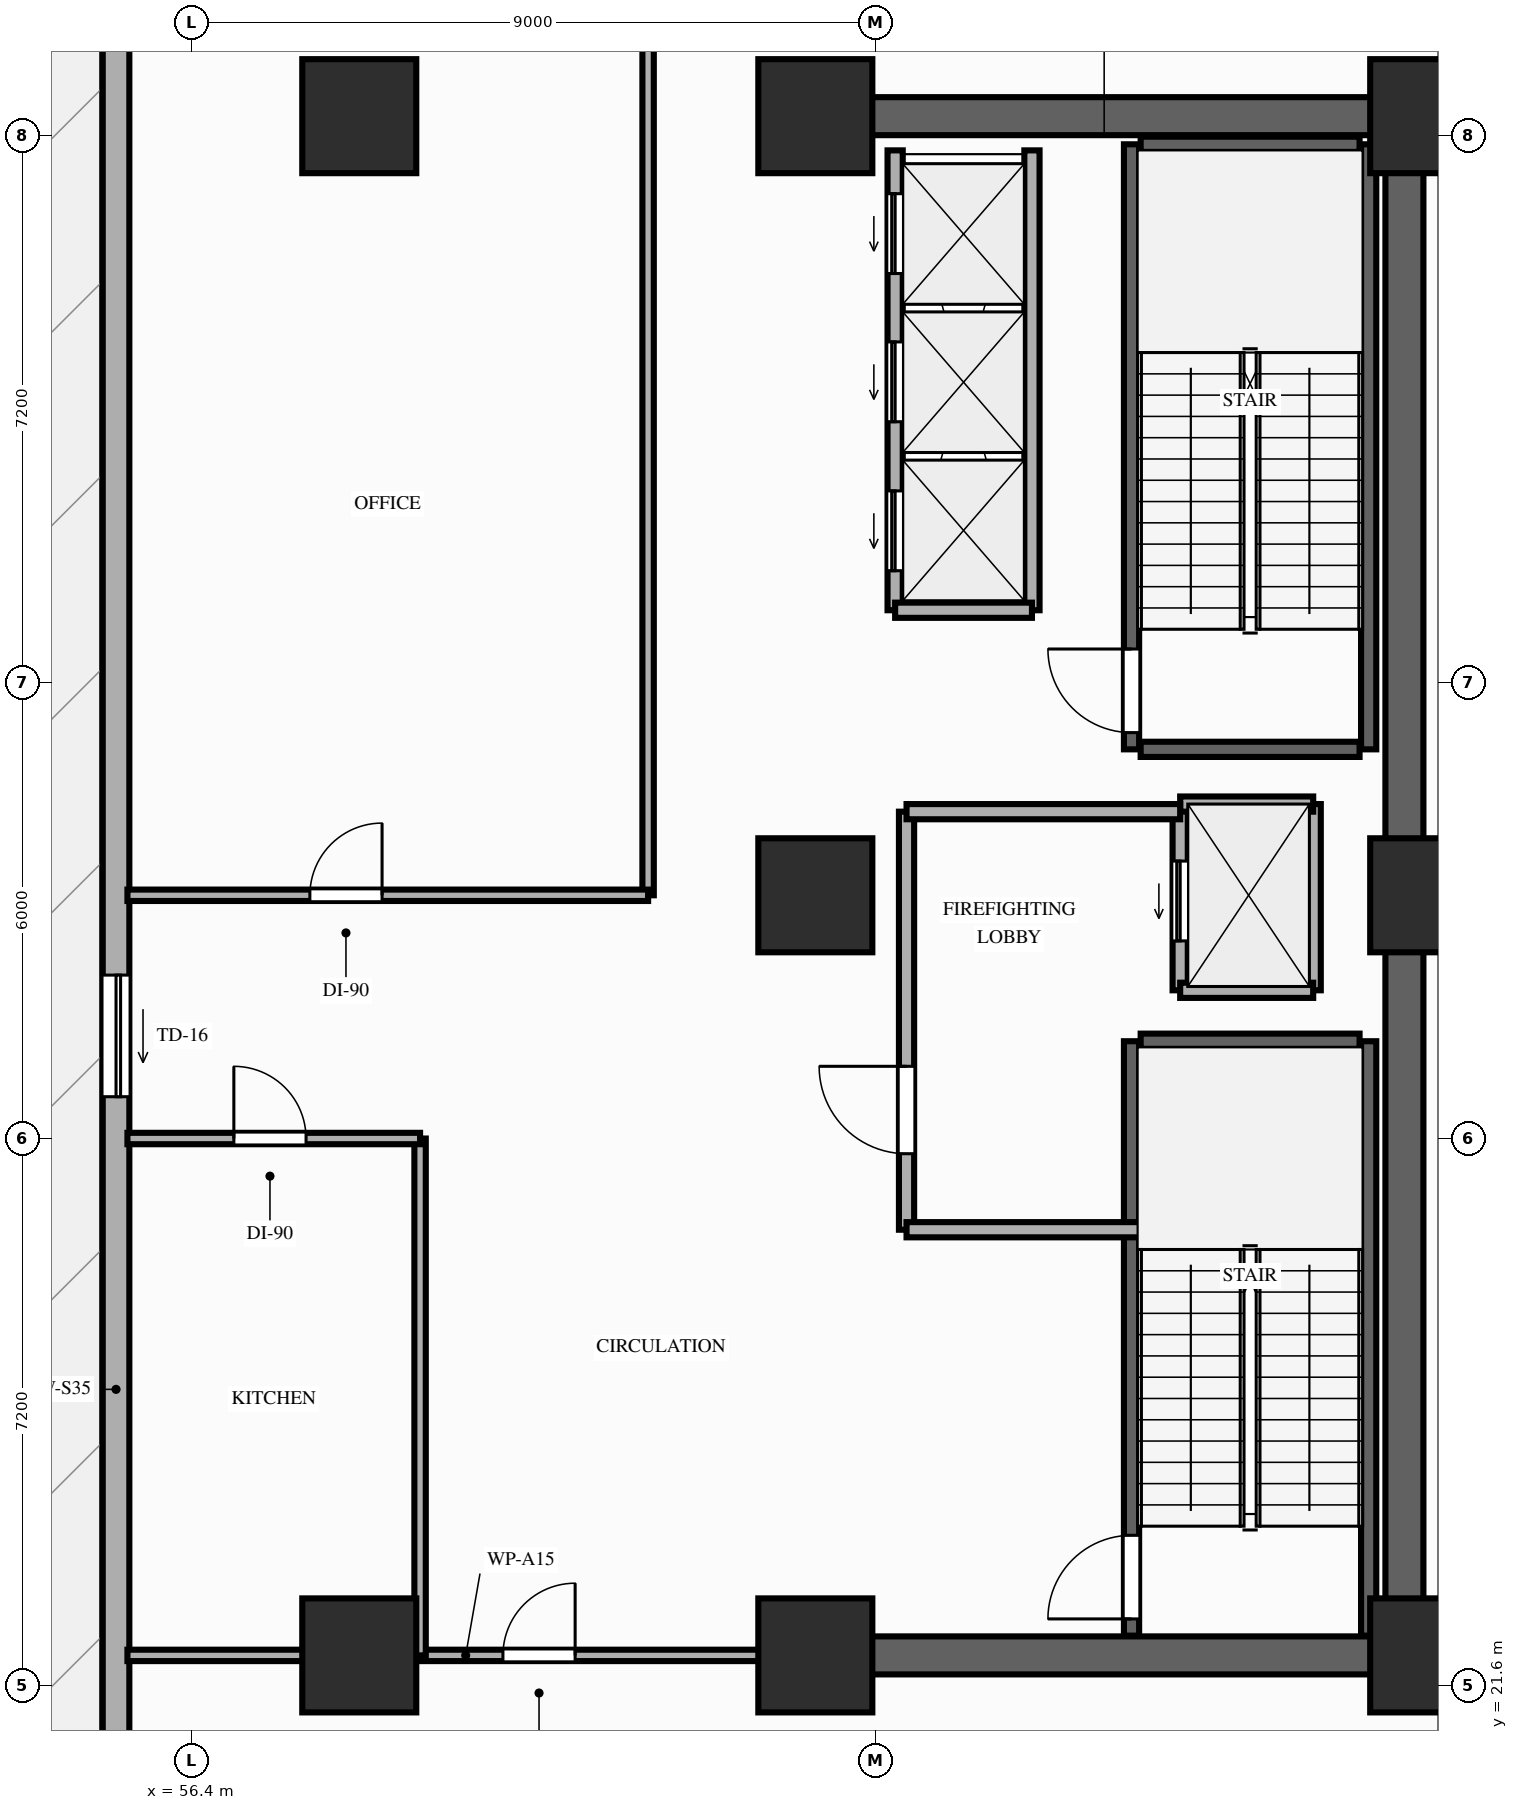
"""IFC4 building model, lengths in metres.
Left out: names, types, materials, properties, quantities, classifications, styles, units other than length and angle.
Written with IfcOpenShell. Run it as: python <this file> out.ifc"""

import sys

from ifc_helpers import new_model, si_unit, direction, frame, frame_2d, origin, origin_2d, place, context, subcontext, project, spatial, rectangle, extrude, element, fill, save


model = new_model("IFC4")
c1 = context("Model", 3, precision=1e-05, world=origin(), true_north=direction((0.0, 1.0)))
c2 = subcontext(c1, "Body", "Model", "MODEL_VIEW")
j1 = project(units=[si_unit("LENGTHUNIT", "METRE"), si_unit("PLANEANGLEUNIT", "RADIAN")], contexts=[c1])
p1 = place(None, origin())
s1 = spatial("IfcSite", under=j1, at=p1, CompositionType="ELEMENT")
p2 = place(p1, origin())
s2 = spatial("IfcBuilding", under=s1, at=p2, CompositionType="ELEMENT")
p3 = place(p2, frame((0.0, 0.0, 21.8)))
s3 = spatial("IfcBuildingStorey", under=s2, at=p3, CompositionType="ELEMENT", Elevation=21.8)
for number, where, z_axis, x_axis in (
    (1, (64.6, 22.0, 0.0), (0.0, 0.0, 1.0), (1.0, 0.0, 0.0)),
    (2, (72.65, 22.0, 0.0), (0.0, 0.0, 1.0), (1.0, 0.0, 0.0)),
    (3, (64.6, 32.0, 0.0), (0.0, 0.0, 1.0), (1.0, 0.0, 0.0)),
    (4, (72.65, 32.0, 0.0), (0.0, 0.0, 1.0), (1.0, 0.0, 0.0)),
    (5, (64.6, 42.25, 0.0), (0.0, 0.0, 1.0), (1.0, 0.0, 0.0)),
    (6, (72.65, 42.25, 0.0), (0.0, 0.0, 1.0), (1.0, 0.0, 0.0)),
):
    element("IfcColumn", number, at=place(p3, frame(where, z_axis=z_axis, x_axis=x_axis)), inside=s3, PredefinedType="COLUMN", context=c2, shape_type="SweptSolid", body=[
        extrude(rectangle(XDim=1.5, YDim=1.5, at=origin_2d()), origin(), (0.0, 0.0, 1.0), 4.6),
    ])
for number, where, z_axis, x_axis in (
    (7, (58.6, 22.0, 0.0), (0.0, 0.0, 1.0), (1.0, 0.0, 0.0)),
    (8, (58.6, 42.25, 0.0), (0.0, 0.0, 1.0), (1.0, 0.0, 0.0)),
):
    element("IfcColumn", number, at=place(p3, frame(where, z_axis=z_axis, x_axis=x_axis)), inside=s3, PredefinedType="COLUMN", context=c2, shape_type="SweptSolid", body=[
        extrude(rectangle(XDim=1.5, YDim=1.5, at=origin_2d()), origin(), (0.0, 0.0, 1.0), 4.05),
    ])
p4 = place(p3, frame((55.4, 43.55, 0.0), z_axis=(0.0, 0.0, 1.0), x_axis=(0.0, -1.0, 0.0)))
e9 = element("IfcWall", 9, at=p4, inside=s3, PredefinedType="STANDARD", context=c2, shape_type="SweptSolid", body=[
    extrude(rectangle(XDim=36.1, YDim=0.35, at=frame_2d((18.05, 0.0))), origin(), (0.0, 0.0, 1.0), 4.36),
])
p5 = place(p4, frame((12.6, 0.0, 0.0)))
e10 = element("IfcOpeningElement", 10, at=p5, cuts=e9, PredefinedType="OPENING", context=c2, shape_type="SweptSolid", body=[
    extrude(rectangle(XDim=1.6, YDim=2.15, at=frame_2d((0.8, 1.075))), frame((0.0, 0.185, 0.0), z_axis=(0.0, -1.0, 0.0), x_axis=(1.0, 0.0, 0.0)), (0.0, 0.0, 1.0), 0.37),
])
p6 = place(p3, frame((72.35, 22.0, 0.0), z_axis=(0.0, 0.0, 1.0), x_axis=(0.0, 1.0, 0.0)))
e11 = element("IfcWall", 11, at=p6, inside=s3, PredefinedType="SHEAR", context=c2, shape_type="SweptSolid", body=[
    extrude(rectangle(XDim=20.25, YDim=0.5, at=frame_2d((10.125, 0.0))), origin(), (0.0, 0.0, 1.0), 4.36),
])
for number, where, z_axis, x_axis in (
    (12, (64.6, 42.25, 0.0), (0.0, 0.0, 1.0), (1.0, 0.0, 0.0)),
    (13, (64.6, 22.0, 0.0), (0.0, 0.0, 1.0), (1.0, 0.0, 0.0)),
):
    element("IfcWall", number, at=place(p3, frame(where, z_axis=z_axis, x_axis=x_axis)), inside=s3, PredefinedType="SHEAR", context=c2, shape_type="SweptSolid", body=[
        extrude(rectangle(XDim=7.5, YDim=0.5, at=frame_2d((3.75, 0.0))), origin(), (0.0, 0.0, 1.0), 4.36),
    ])
p7 = place(p3, frame((68.76, 22.26, 0.0), z_axis=(0.0, 0.0, 1.0), x_axis=(0.0, 1.0, 0.0)))
e14 = element("IfcWall", 14, at=p7, inside=s3, PredefinedType="SHEAR", context=c2, shape_type="SweptSolid", body=[
    extrude(rectangle(XDim=7.82, YDim=0.2, at=frame_2d((3.91, 0.0))), origin(), (0.0, 0.0, 1.0), 4.36),
])
p8 = place(p7, frame((0.22, 0.0, 0.0)))
e15 = element("IfcOpeningElement", 15, at=p8, cuts=e14, PredefinedType="OPENING", context=c2, shape_type="SweptSolid", body=[
    extrude(rectangle(XDim=1.1, YDim=2.15, at=frame_2d((0.55, 1.075))), frame((0.0, 0.11, 0.0), z_axis=(0.0, -1.0, 0.0), x_axis=(1.0, 0.0, 0.0)), (0.0, 0.0, 1.0), 0.22),
])
p9 = place(p3, frame((71.88, 22.26, 0.0), z_axis=(0.0, 0.0, 1.0), x_axis=(0.0, 1.0, 0.0)))
e16 = element("IfcWall", 16, at=p9, inside=s3, PredefinedType="SHEAR", context=c2, shape_type="SweptSolid", body=[
    extrude(rectangle(XDim=7.82, YDim=0.2, at=frame_2d((3.91, 0.0))), origin(), (0.0, 0.0, 1.0), 4.36),
])
p10 = place(p3, frame((68.88, 30.08, 0.0), z_axis=(0.0, 0.0, 1.0), x_axis=(1.0, 0.0, 0.0)))
e17 = element("IfcWall", 17, at=p10, inside=s3, PredefinedType="SHEAR", context=c2, shape_type="SweptSolid", body=[
    extrude(rectangle(XDim=2.88, YDim=0.2, at=frame_2d((1.44, 0.0))), origin(), (0.0, 0.0, 1.0), 4.36),
])
p11 = place(p3, frame((68.76, 33.92, 0.0), z_axis=(0.0, 0.0, 1.0), x_axis=(0.0, 1.0, 0.0)))
e18 = element("IfcWall", 18, at=p11, inside=s3, PredefinedType="SHEAR", context=c2, shape_type="SweptSolid", body=[
    extrude(rectangle(XDim=7.96, YDim=0.2, at=frame_2d((3.98, 0.0))), origin(), (0.0, 0.0, 1.0), 4.36),
])
p12 = place(p11, frame((0.22, 0.0, 0.0)))
e19 = element("IfcOpeningElement", 19, at=p12, cuts=e18, PredefinedType="OPENING", context=c2, shape_type="SweptSolid", body=[
    extrude(rectangle(XDim=1.1, YDim=2.15, at=frame_2d((0.55, 1.075))), frame((0.0, 0.11, 0.0), z_axis=(0.0, -1.0, 0.0), x_axis=(1.0, 0.0, 0.0)), (0.0, 0.0, 1.0), 0.22),
])
p13 = place(p3, frame((71.88, 33.92, 0.0), z_axis=(0.0, 0.0, 1.0), x_axis=(0.0, 1.0, 0.0)))
e20 = element("IfcWall", 20, at=p13, inside=s3, PredefinedType="SHEAR", context=c2, shape_type="SweptSolid", body=[
    extrude(rectangle(XDim=7.96, YDim=0.2, at=frame_2d((3.98, 0.0))), origin(), (0.0, 0.0, 1.0), 4.36),
])
for number, where, z_axis, x_axis in (
    (21, (68.88, 41.88, 0.0), (0.0, 0.0, 1.0), (1.0, 0.0, 0.0)),
    (22, (68.88, 33.92, 0.0), (0.0, 0.0, 1.0), (1.0, 0.0, 0.0)),
):
    element("IfcWall", number, at=place(p3, frame(where, z_axis=z_axis, x_axis=x_axis)), inside=s3, PredefinedType="SHEAR", context=c2, shape_type="SweptSolid", body=[
        extrude(rectangle(XDim=2.88, YDim=0.2, at=frame_2d((1.44, 0.0))), origin(), (0.0, 0.0, 1.0), 4.36),
    ])
p14 = place(p3, frame((65.65, 35.75, 0.0), z_axis=(0.0, 0.0, 1.0), x_axis=(0.0, 1.0, 0.0)))
e23 = element("IfcWall", 23, at=p14, inside=s3, PredefinedType="MOVABLE", context=c2, shape_type="SweptSolid", body=[
    extrude(rectangle(XDim=6.05, YDim=0.2, at=frame_2d((3.025, 0.0))), origin(), (0.0, 0.0, 1.0), 4.36),
])
p15 = place(p14, frame((0.52, 0.0, 0.0)))
e24 = element("IfcOpeningElement", 24, at=p15, cuts=e23, PredefinedType="OPENING", context=c2, shape_type="SweptSolid", body=[
    extrude(rectangle(XDim=1.05, YDim=2.15, at=frame_2d((0.525, 1.075))), frame((0.0, 0.11, 0.0), z_axis=(0.0, -1.0, 0.0), x_axis=(1.0, 0.0, 0.0)), (0.0, 0.0, 1.0), 0.22),
])
p16 = place(p14, frame((2.48, 0.0, 0.0)))
e25 = element("IfcOpeningElement", 25, at=p16, cuts=e23, PredefinedType="OPENING", context=c2, shape_type="SweptSolid", body=[
    extrude(rectangle(XDim=1.05, YDim=2.15, at=frame_2d((0.525, 1.075))), frame((0.0, 0.11, 0.0), z_axis=(0.0, -1.0, 0.0), x_axis=(1.0, 0.0, 0.0)), (0.0, 0.0, 1.0), 0.22),
])
p17 = place(p14, frame((4.43, 0.0, 0.0)))
e26 = element("IfcOpeningElement", 26, at=p17, cuts=e23, PredefinedType="OPENING", context=c2, shape_type="SweptSolid", body=[
    extrude(rectangle(XDim=1.05, YDim=2.15, at=frame_2d((0.525, 1.075))), frame((0.0, 0.11, 0.0), z_axis=(0.0, -1.0, 0.0), x_axis=(1.0, 0.0, 0.0)), (0.0, 0.0, 1.0), 0.22),
])
p18 = place(p3, frame((67.45, 35.75, 0.0), z_axis=(0.0, 0.0, 1.0), x_axis=(0.0, 1.0, 0.0)))
e27 = element("IfcWall", 27, at=p18, inside=s3, PredefinedType="MOVABLE", context=c2, shape_type="SweptSolid", body=[
    extrude(rectangle(XDim=6.05, YDim=0.2, at=frame_2d((3.025, 0.0))), origin(), (0.0, 0.0, 1.0), 4.36),
])
p19 = place(p3, frame((65.65, 35.75, 0.0), z_axis=(0.0, 0.0, 1.0), x_axis=(1.0, 0.0, 0.0)))
e28 = element("IfcWall", 28, at=p19, inside=s3, PredefinedType="MOVABLE", context=c2, shape_type="SweptSolid", body=[
    extrude(rectangle(XDim=1.8, YDim=0.2, at=frame_2d((0.9, 0.0))), origin(), (0.0, 0.0, 1.0), 4.36),
])
p20 = place(p3, frame((69.4, 30.75, 0.0), z_axis=(0.0, 0.0, 1.0), x_axis=(0.0, 1.0, 0.0)))
e29 = element("IfcWall", 29, at=p20, inside=s3, PredefinedType="MOVABLE", context=c2, shape_type="SweptSolid", body=[
    extrude(rectangle(XDim=2.45, YDim=0.2, at=frame_2d((1.225, 0.0))), origin(), (0.0, 0.0, 1.0), 4.36),
])
p21 = place(p20, frame((0.65, 0.0, 0.0)))
e30 = element("IfcOpeningElement", 30, at=p21, cuts=e29, PredefinedType="OPENING", context=c2, shape_type="SweptSolid", body=[
    extrude(rectangle(XDim=1.05, YDim=2.15, at=frame_2d((0.525, 1.075))), frame((0.0, 0.11, 0.0), z_axis=(0.0, -1.0, 0.0), x_axis=(1.0, 0.0, 0.0)), (0.0, 0.0, 1.0), 0.22),
])
p22 = place(p3, frame((71.15, 30.75, 0.0), z_axis=(0.0, 0.0, 1.0), x_axis=(0.0, 1.0, 0.0)))
e31 = element("IfcWall", 31, at=p22, inside=s3, PredefinedType="MOVABLE", context=c2, shape_type="SweptSolid", body=[
    extrude(rectangle(XDim=2.45, YDim=0.2, at=frame_2d((1.225, 0.0))), origin(), (0.0, 0.0, 1.0), 4.36),
])
for number, where, z_axis, x_axis in (
    (32, (69.4, 33.2, 0.0), (0.0, 0.0, 1.0), (1.0, 0.0, 0.0)),
    (33, (69.4, 30.75, 0.0), (0.0, 0.0, 1.0), (1.0, 0.0, 0.0)),
):
    element("IfcWall", number, at=place(p3, frame(where, z_axis=z_axis, x_axis=x_axis)), inside=s3, PredefinedType="MOVABLE", context=c2, shape_type="SweptSolid", body=[
        extrude(rectangle(XDim=1.75, YDim=0.2, at=frame_2d((0.875, 0.0))), origin(), (0.0, 0.0, 1.0), 4.36),
    ])
p23 = place(p3, frame((65.8, 27.6, 0.0), z_axis=(0.0, 0.0, 1.0), x_axis=(0.0, 1.0, 0.0)))
e34 = element("IfcWall", 34, at=p23, inside=s3, PredefinedType="PARTITIONING", context=c2, shape_type="SweptSolid", body=[
    extrude(rectangle(XDim=5.5, YDim=0.2, at=frame_2d((2.75, 0.0))), origin(), (0.0, 0.0, 1.0), 4.36),
])
p24 = place(p23, frame((1.0, 0.0, 0.0)))
e35 = element("IfcOpeningElement", 35, at=p24, cuts=e34, PredefinedType="OPENING", context=c2, shape_type="SweptSolid", body=[
    extrude(rectangle(XDim=1.15, YDim=2.15, at=frame_2d((0.575, 1.075))), frame((0.0, 0.11, 0.0), z_axis=(0.0, -1.0, 0.0), x_axis=(1.0, 0.0, 0.0)), (0.0, 0.0, 1.0), 0.22),
])
p25 = place(p3, frame((65.8, 33.1, 0.0), z_axis=(0.0, 0.0, 1.0), x_axis=(1.0, 0.0, 0.0)))
e36 = element("IfcWall", 36, at=p25, inside=s3, PredefinedType="PARTITIONING", context=c2, shape_type="SweptSolid", body=[
    extrude(rectangle(XDim=3.6, YDim=0.2, at=frame_2d((1.8, 0.0))), origin(), (0.0, 0.0, 1.0), 4.36),
])
p26 = place(p3, frame((65.8, 27.6, 0.0), z_axis=(0.0, 0.0, 1.0), x_axis=(1.0, 0.0, 0.0)))
e37 = element("IfcWall", 37, at=p26, inside=s3, PredefinedType="PARTITIONING", context=c2, shape_type="SweptSolid", body=[
    extrude(rectangle(XDim=3.4, YDim=0.2, at=frame_2d((1.7, 0.0))), origin(), (0.0, 0.0, 1.0), 4.36),
])
p27 = place(p3, frame((55.55, 22.0, 0.0), z_axis=(0.0, 0.0, 1.0), x_axis=(1.0, 0.0, 0.0)))
e38 = element("IfcWall", 38, at=p27, inside=s3, PredefinedType="PARTITIONING", context=c2, shape_type="SweptSolid", body=[
    extrude(rectangle(XDim=8.9, YDim=0.15, at=frame_2d((4.45, 0.0))), origin(), (0.0, 0.0, 1.0), 2.34),
])
p28 = place(p27, frame((4.94, 0.0, 0.0)))
e39 = element("IfcOpeningElement", 39, at=p28, cuts=e38, PredefinedType="OPENING", context=c2, shape_type="SweptSolid", body=[
    extrude(rectangle(XDim=0.95, YDim=2.15, at=frame_2d((0.475, 1.075))), frame((0.0, 0.085, 0.0), z_axis=(0.0, -1.0, 0.0), x_axis=(1.0, 0.0, 0.0)), (0.0, 0.0, 1.0), 0.17),
])
p29 = place(p3, frame((59.4, 22.0, 0.0), z_axis=(0.0, 0.0, 1.0), x_axis=(0.0, 1.0, 0.0)))
e40 = element("IfcWall", 40, at=p29, inside=s3, PredefinedType="PARTITIONING", context=c2, shape_type="SweptSolid", body=[
    extrude(rectangle(XDim=6.8, YDim=0.15, at=frame_2d((3.4, 0.0))), origin(), (0.0, 0.0, 1.0), 3.84),
])
p30 = place(p3, frame((62.4, 32.0, 0.0), z_axis=(0.0, 0.0, 1.0), x_axis=(0.0, 1.0, 0.0)))
e41 = element("IfcWall", 41, at=p30, inside=s3, PredefinedType="PARTITIONING", context=c2, shape_type="SweptSolid", body=[
    extrude(rectangle(XDim=11.45, YDim=0.15, at=frame_2d((5.725, 0.0))), origin(), (0.0, 0.0, 1.0), 3.84),
])
p31 = place(p3, frame((55.55, 28.8, 0.0), z_axis=(0.0, 0.0, 1.0), x_axis=(1.0, 0.0, 0.0)))
e42 = element("IfcWall", 42, at=p31, inside=s3, PredefinedType="PARTITIONING", context=c2, shape_type="SweptSolid", body=[
    extrude(rectangle(XDim=3.85, YDim=0.15, at=frame_2d((1.925, 0.0))), origin(), (0.0, 0.0, 1.0), 2.34),
])
p32 = place(p31, frame((1.4, 0.0, 0.0)))
e43 = element("IfcOpeningElement", 43, at=p32, cuts=e42, PredefinedType="OPENING", context=c2, shape_type="SweptSolid", body=[
    extrude(rectangle(XDim=0.95, YDim=2.15, at=frame_2d((0.475, 1.075))), frame((0.0, 0.085, 0.0), z_axis=(0.0, -1.0, 0.0), x_axis=(1.0, 0.0, 0.0)), (0.0, 0.0, 1.0), 0.17),
])
p33 = place(p3, frame((55.55, 32.0, 0.0), z_axis=(0.0, 0.0, 1.0), x_axis=(1.0, 0.0, 0.0)))
e44 = element("IfcWall", 44, at=p33, inside=s3, PredefinedType="PARTITIONING", context=c2, shape_type="SweptSolid", body=[
    extrude(rectangle(XDim=6.85, YDim=0.15, at=frame_2d((3.425, 0.0))), origin(), (0.0, 0.0, 1.0), 2.34),
])
p34 = place(p33, frame((2.4, 0.0, 0.0)))
e45 = element("IfcOpeningElement", 45, at=p34, cuts=e44, PredefinedType="OPENING", context=c2, shape_type="SweptSolid", body=[
    extrude(rectangle(XDim=0.95, YDim=2.15, at=frame_2d((0.475, 1.075))), frame((0.0, 0.085, 0.0), z_axis=(0.0, -1.0, 0.0), x_axis=(1.0, 0.0, 0.0)), (0.0, 0.0, 1.0), 0.17),
])
p35 = place(p5, origin())
e46 = element("IfcDoor", 46, at=p35, inside=s3, OperationType="SLIDING_TO_RIGHT", PredefinedType="DOOR", context=c2, shape_type="SweptSolid", body=[
    extrude(rectangle(XDim=1.6, YDim=2.15, at=frame_2d((0.8, 1.075))), frame((0.0, 0.025, 0.0), z_axis=(0.0, -1.0, 0.0), x_axis=(1.0, 0.0, 0.0)), (0.0, 0.0, 1.0), 0.05),
])
fill(e10, e46)
p36 = place(p8, origin())
e47 = element("IfcDoor", 47, at=p36, inside=s3, OperationType="SINGLE_SWING_LEFT", PredefinedType="DOOR", context=c2, shape_type="SweptSolid", body=[
    extrude(rectangle(XDim=1.1, YDim=2.15, at=frame_2d((0.55, 1.075))), frame((0.0, 0.025, 0.0), z_axis=(0.0, -1.0, 0.0), x_axis=(1.0, 0.0, 0.0)), (0.0, 0.0, 1.0), 0.05),
])
fill(e15, e47)
p37 = place(p12, origin())
e48 = element("IfcDoor", 48, at=p37, inside=s3, OperationType="SINGLE_SWING_RIGHT", PredefinedType="DOOR", context=c2, shape_type="SweptSolid", body=[
    extrude(rectangle(XDim=1.1, YDim=2.15, at=frame_2d((0.55, 1.075))), frame((0.0, 0.025, 0.0), z_axis=(0.0, -1.0, 0.0), x_axis=(1.0, 0.0, 0.0)), (0.0, 0.0, 1.0), 0.05),
])
fill(e19, e48)
p38 = place(p15, origin())
e49 = element("IfcDoor", 49, at=p38, inside=s3, OperationType="SLIDING_TO_LEFT", PredefinedType="DOOR", context=c2, shape_type="SweptSolid", body=[
    extrude(rectangle(XDim=1.05, YDim=2.15, at=frame_2d((0.525, 1.075))), frame((0.0, 0.025, 0.0), z_axis=(0.0, -1.0, 0.0), x_axis=(1.0, 0.0, 0.0)), (0.0, 0.0, 1.0), 0.05),
])
fill(e24, e49)
p39 = place(p16, origin())
e50 = element("IfcDoor", 50, at=p39, inside=s3, OperationType="SLIDING_TO_LEFT", PredefinedType="DOOR", context=c2, shape_type="SweptSolid", body=[
    extrude(rectangle(XDim=1.05, YDim=2.15, at=frame_2d((0.525, 1.075))), frame((0.0, 0.025, 0.0), z_axis=(0.0, -1.0, 0.0), x_axis=(1.0, 0.0, 0.0)), (0.0, 0.0, 1.0), 0.05),
])
fill(e25, e50)
p40 = place(p17, origin())
e51 = element("IfcDoor", 51, at=p40, inside=s3, OperationType="SLIDING_TO_LEFT", PredefinedType="DOOR", context=c2, shape_type="SweptSolid", body=[
    extrude(rectangle(XDim=1.05, YDim=2.15, at=frame_2d((0.525, 1.075))), frame((0.0, 0.025, 0.0), z_axis=(0.0, -1.0, 0.0), x_axis=(1.0, 0.0, 0.0)), (0.0, 0.0, 1.0), 0.05),
])
fill(e26, e51)
p41 = place(p21, origin())
e52 = element("IfcDoor", 52, at=p41, inside=s3, OperationType="SLIDING_TO_LEFT", PredefinedType="DOOR", context=c2, shape_type="SweptSolid", body=[
    extrude(rectangle(XDim=1.05, YDim=2.15, at=frame_2d((0.525, 1.075))), frame((0.0, 0.025, 0.0), z_axis=(0.0, -1.0, 0.0), x_axis=(1.0, 0.0, 0.0)), (0.0, 0.0, 1.0), 0.05),
])
fill(e30, e52)
p42 = place(p24, origin())
e53 = element("IfcDoor", 53, at=p42, inside=s3, OperationType="SINGLE_SWING_RIGHT", PredefinedType="DOOR", context=c2, shape_type="SweptSolid", body=[
    extrude(rectangle(XDim=1.15, YDim=2.15, at=frame_2d((0.575, 1.075))), frame((0.0, 0.025, 0.0), z_axis=(0.0, -1.0, 0.0), x_axis=(1.0, 0.0, 0.0)), (0.0, 0.0, 1.0), 0.05),
])
fill(e35, e53)
p43 = place(p28, origin())
e54 = element("IfcDoor", 54, at=p43, inside=s3, OperationType="SINGLE_SWING_RIGHT", PredefinedType="DOOR", context=c2, shape_type="SweptSolid", body=[
    extrude(rectangle(XDim=0.95, YDim=2.15, at=frame_2d((0.475, 1.075))), frame((0.0, 0.025, 0.0), z_axis=(0.0, -1.0, 0.0), x_axis=(1.0, 0.0, 0.0)), (0.0, 0.0, 1.0), 0.05),
])
fill(e39, e54)
p44 = place(p32, origin())
e55 = element("IfcDoor", 55, at=p44, inside=s3, OperationType="SINGLE_SWING_LEFT", PredefinedType="DOOR", context=c2, shape_type="SweptSolid", body=[
    extrude(rectangle(XDim=0.95, YDim=2.15, at=frame_2d((0.475, 1.075))), frame((0.0, 0.025, 0.0), z_axis=(0.0, -1.0, 0.0), x_axis=(1.0, 0.0, 0.0)), (0.0, 0.0, 1.0), 0.05),
])
fill(e43, e55)
p45 = place(p34, origin())
e56 = element("IfcDoor", 56, at=p45, inside=s3, OperationType="SINGLE_SWING_RIGHT", PredefinedType="DOOR", context=c2, shape_type="SweptSolid", body=[
    extrude(rectangle(XDim=0.95, YDim=2.15, at=frame_2d((0.475, 1.075))), frame((0.0, 0.025, 0.0), z_axis=(0.0, -1.0, 0.0), x_axis=(1.0, 0.0, 0.0)), (0.0, 0.0, 1.0), 0.05),
])
fill(e45, e56)
save(model, sys.argv[1])
